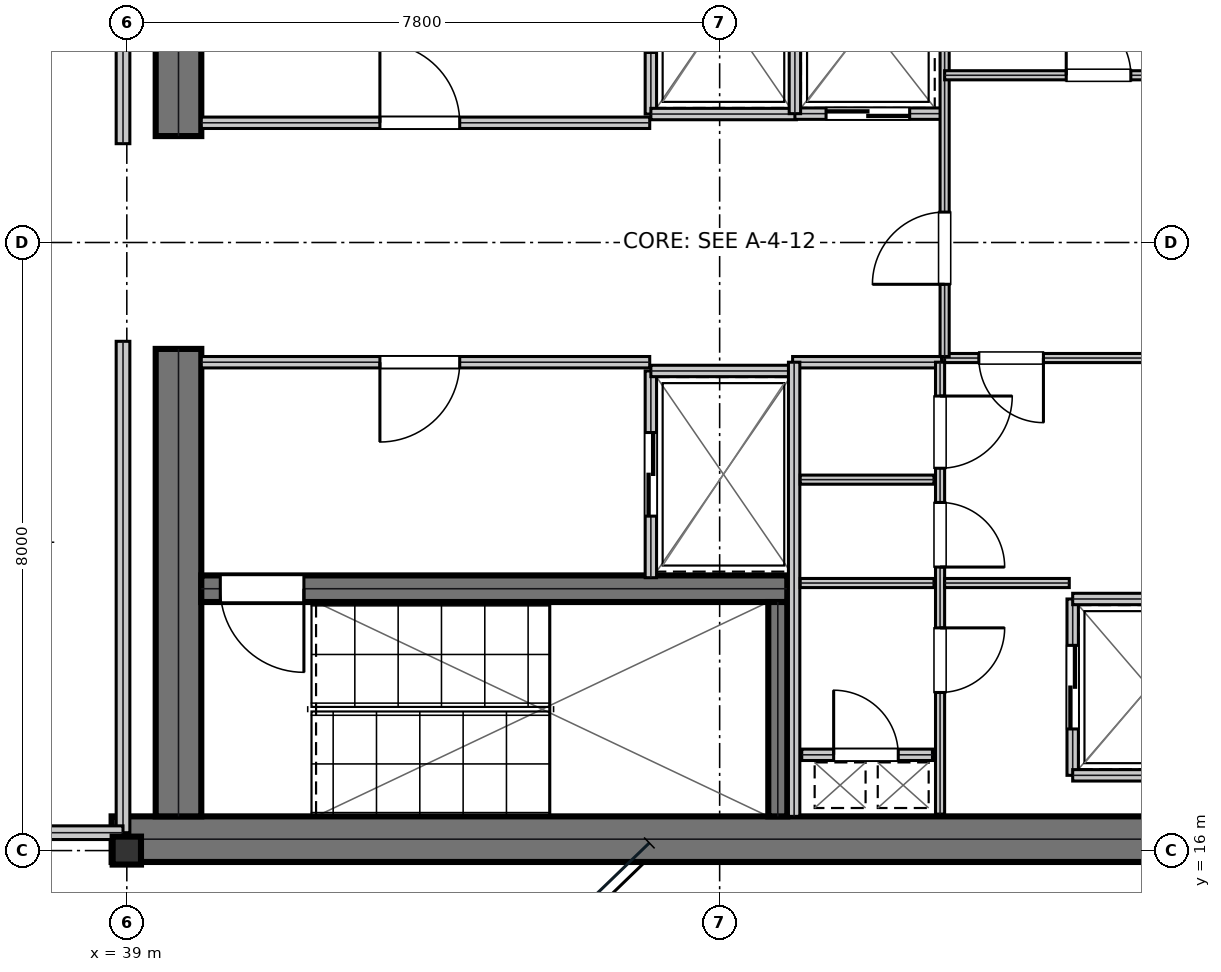
"""IFC4 building model, lengths in metres.
Left out: names, types, materials, properties, quantities, classifications, styles, units other than length and angle.
Written with IfcOpenShell. Run it as: python <this file> out.ifc"""

import sys

from ifc_helpers import new_model, si_unit, direction, frame, frame_2d, origin, origin_2d, place, context, subcontext, project, spatial, rectangle, i_section, extrude, element, fill, save


model = new_model("IFC4")
c1 = context("Model", 3, precision=1e-05, world=origin(), true_north=direction((0.0, 1.0)))
c2 = subcontext(c1, "Body", "Model", "MODEL_VIEW")
j1 = project(units=[si_unit("LENGTHUNIT", "METRE"), si_unit("PLANEANGLEUNIT", "RADIAN")], contexts=[c1])
p1 = place(None, origin())
s1 = spatial("IfcSite", under=j1, at=p1, CompositionType="ELEMENT")
p2 = place(p1, origin())
s2 = spatial("IfcBuilding", under=s1, at=p2, CompositionType="ELEMENT")
p3 = place(p2, frame((0.0, 0.0, 319.5)))
s3 = spatial("IfcBuildingStorey", under=s2, at=p3, CompositionType="ELEMENT", Elevation=319.5)
p4 = place(p3, frame((38.8, 16.15, 0.0), z_axis=(0.0, 0.0, 1.0), x_axis=(1.0, 0.0, 0.0)))
e1 = element("IfcWall", 1, at=p4, inside=s3, PredefinedType="SHEAR", context=c2, shape_type="SweptSolid", body=[
    extrude(rectangle(XDim=16.0, YDim=0.6, at=frame_2d((8.0, 0.0))), origin(), (0.0, 0.0, 1.0), 3.81),
])
for number, where, z_axis, x_axis in (
    (2, (39.68, 16.45, 0.0), (0.0, 0.0, 1.0), (0.0, 1.0, 0.0)),
    (3, (39.68, 25.4, 0.0), (0.0, 0.0, 1.0), (0.0, 1.0, 0.0)),
):
    element("IfcWall", number, at=place(p3, frame(where, z_axis=z_axis, x_axis=x_axis)), inside=s3, PredefinedType="SHEAR", context=c2, shape_type="SweptSolid", body=[
        extrude(rectangle(XDim=6.15, YDim=0.6, at=frame_2d((3.075, 0.0))), origin(), (0.0, 0.0, 1.0), 3.81),
    ])
p5 = place(p3, frame((39.98, 19.445, 0.0), z_axis=(0.0, 0.0, 1.0), x_axis=(1.0, 0.0, 0.0)))
e4 = element("IfcWall", 4, at=p5, inside=s3, PredefinedType="SHEAR", context=c2, shape_type="SweptSolid", body=[
    extrude(rectangle(XDim=7.71, YDim=0.35, at=frame_2d((3.855, 0.0))), origin(), (0.0, 0.0, 1.0), 3.81),
])
p6 = place(p5, frame((0.25, 0.0, 0.0)))
e5 = element("IfcOpeningElement", 5, at=p6, cuts=e4, PredefinedType="OPENING", context=c2, shape_type="SweptSolid", body=[
    extrude(rectangle(XDim=1.1, YDim=2.15, at=frame_2d((0.55, 1.075))), frame((0.0, 0.185, 0.0), z_axis=(0.0, -1.0, 0.0), x_axis=(1.0, 0.0, 0.0)), (0.0, 0.0, 1.0), 0.37),
])
p7 = place(p3, frame((47.565, 16.45, 0.0), z_axis=(0.0, 0.0, 1.0), x_axis=(0.0, 1.0, 0.0)))
e6 = element("IfcWall", 6, at=p7, inside=s3, PredefinedType="SHEAR", context=c2, shape_type="SweptSolid", body=[
    extrude(rectangle(XDim=2.82, YDim=0.25, at=frame_2d((1.41, 0.0))), origin(), (0.0, 0.0, 1.0), 3.81),
])
p8 = place(p3, frame((39.0, 16.0, 0.0), z_axis=(0.0, 0.0, 1.0), x_axis=(1.0, 0.0, 0.0)))
e7 = element("IfcColumn", 7, at=p8, inside=s3, PredefinedType="COLUMN", context=c2, shape_type="SweptSolid", body=[
    extrude(i_section(OverallWidth=0.373, OverallDepth=0.368, WebThickness=0.015, FlangeThickness=0.024, at=origin_2d()), origin(), (0.0, 0.0, 1.0), 4.044),
])
p9 = place(p3, frame((39.98, 25.575, 0.0), z_axis=(0.0, 0.0, 1.0), x_axis=(1.0, 0.0, 0.0)))
e8 = element("IfcWall", 8, at=p9, inside=s3, PredefinedType="PARTITIONING", context=c2, shape_type="SweptSolid", body=[
    extrude(rectangle(XDim=5.9, YDim=0.15, at=frame_2d((2.95, 0.0))), origin(), (0.0, 0.0, 1.0), 3.81),
])
p10 = place(p9, frame((2.35, 0.0, 0.0)))
e9 = element("IfcOpeningElement", 9, at=p10, cuts=e8, PredefinedType="OPENING", context=c2, shape_type="SweptSolid", body=[
    extrude(rectangle(XDim=1.05, YDim=2.15, at=frame_2d((0.525, 1.075))), frame((0.0, 0.085, 0.0), z_axis=(0.0, -1.0, 0.0), x_axis=(1.0, 0.0, 0.0)), (0.0, 0.0, 1.0), 0.17),
])
p11 = place(p3, frame((39.98, 22.425, 0.0), z_axis=(0.0, 0.0, 1.0), x_axis=(1.0, 0.0, 0.0)))
e10 = element("IfcWall", 10, at=p11, inside=s3, PredefinedType="PARTITIONING", context=c2, shape_type="SweptSolid", body=[
    extrude(rectangle(XDim=5.9, YDim=0.15, at=frame_2d((2.95, 0.0))), origin(), (0.0, 0.0, 1.0), 3.81),
])
p12 = place(p11, frame((2.35, 0.0, 0.0)))
e11 = element("IfcOpeningElement", 11, at=p12, cuts=e10, PredefinedType="OPENING", context=c2, shape_type="SweptSolid", body=[
    extrude(rectangle(XDim=1.05, YDim=2.15, at=frame_2d((0.525, 1.075))), frame((0.0, 0.085, 0.0), z_axis=(0.0, -1.0, 0.0), x_axis=(1.0, 0.0, 0.0)), (0.0, 0.0, 1.0), 0.17),
])
p13 = place(p3, frame((45.895, 25.69, 0.0), z_axis=(0.0, 0.0, 1.0), x_axis=(0.0, 1.0, 0.0)))
e12 = element("IfcWall", 12, at=p13, inside=s3, PredefinedType="PARTITIONING", context=c2, shape_type="SweptSolid", body=[
    extrude(rectangle(XDim=2.72, YDim=0.15, at=frame_2d((1.36, 0.0))), origin(), (0.0, 0.0, 1.0), 3.81),
])
p14 = place(p13, frame((0.81, 0.0, 0.0)))
e13 = element("IfcOpeningElement", 13, at=p14, cuts=e12, PredefinedType="OPENING", context=c2, shape_type="SweptSolid", body=[
    extrude(rectangle(XDim=1.1, YDim=2.15, at=frame_2d((0.55, 1.075))), frame((0.0, 0.085, 0.0), z_axis=(0.0, -1.0, 0.0), x_axis=(1.0, 0.0, 0.0)), (0.0, 0.0, 1.0), 0.17),
])
p15 = place(p3, frame((45.895, 25.69, 0.0), z_axis=(0.0, 0.0, 1.0), x_axis=(1.0, 0.0, 0.0)))
e14 = element("IfcWall", 14, at=p15, inside=s3, PredefinedType="PARTITIONING", context=c2, shape_type="SweptSolid", body=[
    extrude(rectangle(XDim=1.915, YDim=0.15, at=frame_2d((0.958, 0.0))), origin(), (0.0, 0.0, 1.0), 3.81),
])
p16 = place(p3, frame((45.895, 19.59, 0.0), z_axis=(0.0, 0.0, 1.0), x_axis=(0.0, 1.0, 0.0)))
e15 = element("IfcWall", 15, at=p16, inside=s3, PredefinedType="PARTITIONING", context=c2, shape_type="SweptSolid", body=[
    extrude(rectangle(XDim=2.72, YDim=0.15, at=frame_2d((1.36, 0.0))), origin(), (0.0, 0.0, 1.0), 3.81),
])
p17 = place(p16, frame((0.81, 0.0, 0.0)))
e16 = element("IfcOpeningElement", 16, at=p17, cuts=e15, PredefinedType="OPENING", context=c2, shape_type="SweptSolid", body=[
    extrude(rectangle(XDim=1.1, YDim=2.15, at=frame_2d((0.55, 1.075))), frame((0.0, 0.085, 0.0), z_axis=(0.0, -1.0, 0.0), x_axis=(1.0, 0.0, 0.0)), (0.0, 0.0, 1.0), 0.17),
])
p18 = place(p3, frame((45.895, 22.31, 0.0), z_axis=(0.0, 0.0, 1.0), x_axis=(1.0, 0.0, 0.0)))
e17 = element("IfcWall", 17, at=p18, inside=s3, PredefinedType="PARTITIONING", context=c2, shape_type="SweptSolid", body=[
    extrude(rectangle(XDim=1.915, YDim=0.15, at=frame_2d((0.958, 0.0))), origin(), (0.0, 0.0, 1.0), 3.81),
])
p19 = place(p3, frame((47.79, 25.695, 0.0), z_axis=(0.0, 0.0, 1.0), x_axis=(1.0, 0.0, 0.0)))
e18 = element("IfcWall", 18, at=p19, inside=s3, PredefinedType="PARTITIONING", context=c2, shape_type="SweptSolid", body=[
    extrude(rectangle(XDim=1.92, YDim=0.15, at=frame_2d((0.96, 0.0))), origin(), (0.0, 0.0, 1.0), 3.81),
])
p20 = place(p19, frame((0.41, 0.0, 0.0)))
e19 = element("IfcOpeningElement", 19, at=p20, cuts=e18, PredefinedType="OPENING", context=c2, shape_type="SweptSolid", body=[
    extrude(rectangle(XDim=1.1, YDim=2.15, at=frame_2d((0.55, 1.075))), frame((0.0, 0.085, 0.0), z_axis=(0.0, -1.0, 0.0), x_axis=(1.0, 0.0, 0.0)), (0.0, 0.0, 1.0), 0.17),
])
p21 = place(p3, frame((47.79, 25.695, 0.0), z_axis=(0.0, 0.0, 1.0), x_axis=(0.0, 1.0, 0.0)))
e20 = element("IfcWall", 20, at=p21, inside=s3, PredefinedType="PARTITIONING", context=c2, shape_type="SweptSolid", body=[
    extrude(rectangle(XDim=2.415, YDim=0.15, at=frame_2d((1.208, 0.0))), origin(), (0.0, 0.0, 1.0), 3.81),
])
p22 = place(p3, frame((51.445, 16.99, 0.0), z_axis=(0.0, 0.0, 1.0), x_axis=(0.0, 1.0, 0.0)))
e21 = element("IfcWall", 21, at=p22, inside=s3, PredefinedType="PARTITIONING", context=c2, shape_type="SweptSolid", body=[
    extrude(rectangle(XDim=2.32, YDim=0.15, at=frame_2d((1.16, 0.0))), origin(), (0.0, 0.0, 1.0), 3.81),
])
p23 = place(p22, frame((0.61, 0.0, 0.0)))
e22 = element("IfcOpeningElement", 22, at=p23, cuts=e21, PredefinedType="OPENING", context=c2, shape_type="SweptSolid", body=[
    extrude(rectangle(XDim=1.1, YDim=2.15, at=frame_2d((0.55, 1.075))), frame((0.0, 0.085, 0.0), z_axis=(0.0, -1.0, 0.0), x_axis=(1.0, 0.0, 0.0)), (0.0, 0.0, 1.0), 0.17),
])
for number, where, z_axis, x_axis in (
    (23, (51.445, 16.99, 0.0), (0.0, 0.0, 1.0), (1.0, 0.0, 0.0)),
    (24, (51.445, 19.31, 0.0), (0.0, 0.0, 1.0), (1.0, 0.0, 0.0)),
):
    element("IfcWall", number, at=place(p3, frame(where, z_axis=z_axis, x_axis=x_axis)), inside=s3, PredefinedType="PARTITIONING", context=c2, shape_type="SweptSolid", body=[
        extrude(rectangle(XDim=2.015, YDim=0.15, at=frame_2d((1.007, 0.0))), origin(), (0.0, 0.0, 1.0), 3.81),
    ])
p24 = place(p3, frame((47.88, 17.26, 0.0), z_axis=(0.0, 0.0, 1.0), x_axis=(1.0, 0.0, 0.0)))
e25 = element("IfcWall", 25, at=p24, inside=s3, PredefinedType="PARTITIONING", context=c2, shape_type="SweptSolid", body=[
    extrude(rectangle(XDim=1.72, YDim=0.15, at=frame_2d((0.86, 0.0))), origin(), (0.0, 0.0, 1.0), 3.81),
])
p25 = place(p24, frame((0.42, 0.0, 0.0)))
e26 = element("IfcOpeningElement", 26, at=p25, cuts=e25, PredefinedType="OPENING", context=c2, shape_type="SweptSolid", body=[
    extrude(rectangle(XDim=0.85, YDim=2.15, at=frame_2d((0.425, 1.075))), frame((0.0, 0.085, 0.0), z_axis=(0.0, -1.0, 0.0), x_axis=(1.0, 0.0, 0.0)), (0.0, 0.0, 1.0), 0.17),
])
p26 = place(p3, frame((47.76, 22.425, 0.0), z_axis=(0.0, 0.0, 1.0), x_axis=(1.0, 0.0, 0.0)))
e27 = element("IfcWall", 27, at=p26, inside=s3, PredefinedType="PARTITIONING", context=c2, shape_type="SweptSolid", body=[
    extrude(rectangle(XDim=1.96, YDim=0.15, at=frame_2d((0.98, 0.0))), origin(), (0.0, 0.0, 1.0), 3.81),
])
p27 = place(p3, frame((47.78, 16.45, 0.0), z_axis=(0.0, 0.0, 1.0), x_axis=(0.0, 1.0, 0.0)))
e28 = element("IfcWall", 28, at=p27, inside=s3, PredefinedType="PARTITIONING", context=c2, shape_type="SweptSolid", body=[
    extrude(rectangle(XDim=5.975, YDim=0.15, at=frame_2d((2.988, 0.0))), origin(), (0.0, 0.0, 1.0), 3.81),
])
for number, where, z_axis, x_axis in (
    (29, (47.86, 19.52, 0.0), (0.0, 0.0, 1.0), (1.0, 0.0, 0.0)),
    (30, (47.86, 20.88, 0.0), (0.0, 0.0, 1.0), (1.0, 0.0, 0.0)),
):
    element("IfcWall", number, at=place(p3, frame(where, z_axis=z_axis, x_axis=x_axis)), inside=s3, PredefinedType="PARTITIONING", context=c2, shape_type="SweptSolid", body=[
        extrude(rectangle(XDim=1.76, YDim=0.12, at=frame_2d((0.88, 0.0))), origin(), (0.0, 0.0, 1.0), 3.81),
    ])
p28 = place(p3, frame((49.7, 16.48, 0.0), z_axis=(0.0, 0.0, 1.0), x_axis=(0.0, 1.0, 0.0)))
e31 = element("IfcWall", 31, at=p28, inside=s3, PredefinedType="PARTITIONING", context=c2, shape_type="SweptSolid", body=[
    extrude(rectangle(XDim=5.945, YDim=0.12, at=frame_2d((2.973, 0.0))), origin(), (0.0, 0.0, 1.0), 3.81),
])
p29 = place(p28, frame((1.6, 0.0, 0.0)))
e32 = element("IfcOpeningElement", 32, at=p29, cuts=e31, PredefinedType="OPENING", context=c2, shape_type="SweptSolid", body=[
    extrude(rectangle(XDim=0.85, YDim=2.15, at=frame_2d((0.425, 1.075))), frame((0.0, 0.07, 0.0), z_axis=(0.0, -1.0, 0.0), x_axis=(1.0, 0.0, 0.0)), (0.0, 0.0, 1.0), 0.14),
])
p30 = place(p28, frame((3.25, 0.0, 0.0)))
e33 = element("IfcOpeningElement", 33, at=p30, cuts=e31, PredefinedType="OPENING", context=c2, shape_type="SweptSolid", body=[
    extrude(rectangle(XDim=0.85, YDim=2.15, at=frame_2d((0.425, 1.075))), frame((0.0, 0.07, 0.0), z_axis=(0.0, -1.0, 0.0), x_axis=(1.0, 0.0, 0.0)), (0.0, 0.0, 1.0), 0.14),
])
p31 = place(p28, frame((4.55, 0.0, 0.0)))
e34 = element("IfcOpeningElement", 34, at=p31, cuts=e31, PredefinedType="OPENING", context=c2, shape_type="SweptSolid", body=[
    extrude(rectangle(XDim=0.95, YDim=2.15, at=frame_2d((0.475, 1.075))), frame((0.0, 0.07, 0.0), z_axis=(0.0, -1.0, 0.0), x_axis=(1.0, 0.0, 0.0)), (0.0, 0.0, 1.0), 0.14),
])
p32 = place(p3, frame((49.76, 22.48, 0.0), z_axis=(0.0, 0.0, 1.0), x_axis=(1.0, 0.0, 0.0)))
e35 = element("IfcWall", 35, at=p32, inside=s3, PredefinedType="PARTITIONING", context=c2, shape_type="SweptSolid", body=[
    extrude(rectangle(XDim=3.9, YDim=0.12, at=frame_2d((1.95, 0.0))), origin(), (0.0, 0.0, 1.0), 3.81),
])
p33 = place(p32, frame((0.45, 0.0, 0.0)))
e36 = element("IfcOpeningElement", 36, at=p33, cuts=e35, PredefinedType="OPENING", context=c2, shape_type="SweptSolid", body=[
    extrude(rectangle(XDim=0.85, YDim=2.15, at=frame_2d((0.425, 1.075))), frame((0.0, 0.07, 0.0), z_axis=(0.0, -1.0, 0.0), x_axis=(1.0, 0.0, 0.0)), (0.0, 0.0, 1.0), 0.14),
])
p34 = place(p3, frame((49.76, 19.52, 0.0), z_axis=(0.0, 0.0, 1.0), x_axis=(1.0, 0.0, 0.0)))
e37 = element("IfcWall", 37, at=p34, inside=s3, PredefinedType="PARTITIONING", context=c2, shape_type="SweptSolid", body=[
    extrude(rectangle(XDim=1.64, YDim=0.12, at=frame_2d((0.82, 0.0))), origin(), (0.0, 0.0, 1.0), 3.81),
])
p35 = place(p3, frame((49.76, 22.5, 0.0), z_axis=(0.0, 0.0, 1.0), x_axis=(0.0, 1.0, 0.0)))
e38 = element("IfcWall", 38, at=p35, inside=s3, PredefinedType="PARTITIONING", context=c2, shape_type="SweptSolid", body=[
    extrude(rectangle(XDim=5.72, YDim=0.12, at=frame_2d((2.86, 0.0))), origin(), (0.0, 0.0, 1.0), 3.81),
])
p36 = place(p35, frame((0.95, 0.0, 0.0)))
e39 = element("IfcOpeningElement", 39, at=p36, cuts=e38, PredefinedType="OPENING", context=c2, shape_type="SweptSolid", body=[
    extrude(rectangle(XDim=0.95, YDim=2.15, at=frame_2d((0.475, 1.075))), frame((0.0, 0.07, 0.0), z_axis=(0.0, -1.0, 0.0), x_axis=(1.0, 0.0, 0.0)), (0.0, 0.0, 1.0), 0.14),
])
p37 = place(p3, frame((49.76, 26.2, 0.0), z_axis=(0.0, 0.0, 1.0), x_axis=(1.0, 0.0, 0.0)))
e40 = element("IfcWall", 40, at=p37, inside=s3, PredefinedType="PARTITIONING", context=c2, shape_type="SweptSolid", body=[
    extrude(rectangle(XDim=3.9, YDim=0.12, at=frame_2d((1.95, 0.0))), origin(), (0.0, 0.0, 1.0), 3.81),
])
p38 = place(p37, frame((1.6, 0.0, 0.0)))
e41 = element("IfcOpeningElement", 41, at=p38, cuts=e40, PredefinedType="OPENING", context=c2, shape_type="SweptSolid", body=[
    extrude(rectangle(XDim=0.85, YDim=2.15, at=frame_2d((0.425, 1.075))), frame((0.0, 0.07, 0.0), z_axis=(0.0, -1.0, 0.0), x_axis=(1.0, 0.0, 0.0)), (0.0, 0.0, 1.0), 0.14),
])
p39 = place(p3, frame((38.95, 16.235, 0.0), z_axis=(0.0, 0.0, 1.0), x_axis=(0.0, 1.0, 0.0)))
e42 = element("IfcWall", 42, at=p39, inside=s3, PredefinedType="SOLIDWALL", context=c2, shape_type="SweptSolid", body=[
    extrude(rectangle(XDim=6.465, YDim=0.18, at=frame_2d((3.232, 0.0))), origin(), (0.0, 0.0, 1.0), 2.886),
])
p40 = place(p3, frame((37.05, 16.235, 0.0), z_axis=(0.0, 0.0, 1.0), x_axis=(1.0, 0.0, 0.0)))
e43 = element("IfcWall", 43, at=p40, inside=s3, PredefinedType="SOLIDWALL", context=c2, shape_type="SweptSolid", body=[
    extrude(rectangle(XDim=1.9, YDim=0.18, at=frame_2d((0.95, 0.0))), origin(), (0.0, 0.0, 1.0), 3.27),
])
p41 = place(p3, frame((38.95, 25.3, 0.0), z_axis=(0.0, 0.0, 1.0), x_axis=(0.0, 1.0, 0.0)))
e44 = element("IfcWall", 44, at=p41, inside=s3, PredefinedType="SOLIDWALL", context=c2, shape_type="SweptSolid", body=[
    extrude(rectangle(XDim=6.465, YDim=0.18, at=frame_2d((3.232, 0.0))), origin(), (0.0, 0.0, 1.0), 2.886),
])
p42 = place(p10, origin())
e45 = element("IfcDoor", 45, at=p42, inside=s3, OperationType="SINGLE_SWING_LEFT", PredefinedType="DOOR", context=c2, shape_type="SweptSolid", body=[
    extrude(rectangle(XDim=1.05, YDim=2.15, at=frame_2d((0.525, 1.075))), frame((0.0, 0.025, 0.0), z_axis=(0.0, -1.0, 0.0), x_axis=(1.0, 0.0, 0.0)), (0.0, 0.0, 1.0), 0.05),
])
fill(e9, e45)
p43 = place(p12, frame((1.05, 0.0, 0.0), z_axis=(0.0, 0.0, 1.0), x_axis=(-1.0, 0.0, 0.0)))
e46 = element("IfcDoor", 46, at=p43, inside=s3, OperationType="SINGLE_SWING_RIGHT", PredefinedType="DOOR", context=c2, shape_type="SweptSolid", body=[
    extrude(rectangle(XDim=1.05, YDim=2.15, at=frame_2d((0.525, 1.075))), frame((0.0, 0.025, 0.0), z_axis=(0.0, -1.0, 0.0), x_axis=(1.0, 0.0, 0.0)), (0.0, 0.0, 1.0), 0.05),
])
fill(e11, e46)
p44 = place(p17, frame((1.1, 0.0, 0.0), z_axis=(0.0, 0.0, 1.0), x_axis=(-1.0, 0.0, 0.0)))
e47 = element("IfcDoor", 47, at=p44, inside=s3, OperationType="DOUBLE_DOOR_SLIDING", PredefinedType="DOOR", context=c2, shape_type="SweptSolid", body=[
    extrude(rectangle(XDim=1.1, YDim=2.15, at=frame_2d((0.55, 1.075))), frame((0.0, 0.025, 0.0), z_axis=(0.0, -1.0, 0.0), x_axis=(1.0, 0.0, 0.0)), (0.0, 0.0, 1.0), 0.05),
])
fill(e16, e47)
p45 = place(p20, frame((1.1, 0.0, 0.0), z_axis=(0.0, 0.0, 1.0), x_axis=(-1.0, 0.0, 0.0)))
e48 = element("IfcDoor", 48, at=p45, inside=s3, OperationType="DOUBLE_DOOR_SLIDING", PredefinedType="DOOR", context=c2, shape_type="SweptSolid", body=[
    extrude(rectangle(XDim=1.1, YDim=2.15, at=frame_2d((0.55, 1.075))), frame((0.0, 0.025, 0.0), z_axis=(0.0, -1.0, 0.0), x_axis=(1.0, 0.0, 0.0)), (0.0, 0.0, 1.0), 0.05),
])
fill(e19, e48)
p46 = place(p23, frame((1.1, 0.0, 0.0), z_axis=(0.0, 0.0, 1.0), x_axis=(-1.0, 0.0, 0.0)))
e49 = element("IfcDoor", 49, at=p46, inside=s3, OperationType="DOUBLE_DOOR_SLIDING", PredefinedType="DOOR", context=c2, shape_type="SweptSolid", body=[
    extrude(rectangle(XDim=1.1, YDim=2.15, at=frame_2d((0.55, 1.075))), frame((0.0, 0.025, 0.0), z_axis=(0.0, -1.0, 0.0), x_axis=(1.0, 0.0, 0.0)), (0.0, 0.0, 1.0), 0.05),
])
fill(e22, e49)
p47 = place(p25, origin())
e50 = element("IfcDoor", 50, at=p47, inside=s3, OperationType="SINGLE_SWING_LEFT", PredefinedType="TRAPDOOR", context=c2, shape_type="SweptSolid", body=[
    extrude(rectangle(XDim=0.85, YDim=2.15, at=frame_2d((0.425, 1.075))), frame((0.0, 0.025, 0.0), z_axis=(0.0, -1.0, 0.0), x_axis=(1.0, 0.0, 0.0)), (0.0, 0.0, 1.0), 0.05),
])
fill(e26, e50)
p48 = place(p29, frame((0.85, 0.0, 0.0), z_axis=(0.0, 0.0, 1.0), x_axis=(-1.0, 0.0, 0.0)))
e51 = element("IfcDoor", 51, at=p48, inside=s3, OperationType="SINGLE_SWING_LEFT", PredefinedType="DOOR", context=c2, shape_type="SweptSolid", body=[
    extrude(rectangle(XDim=0.85, YDim=2.15, at=frame_2d((0.425, 1.075))), frame((0.0, 0.025, 0.0), z_axis=(0.0, -1.0, 0.0), x_axis=(1.0, 0.0, 0.0)), (0.0, 0.0, 1.0), 0.05),
])
fill(e32, e51)
p49 = place(p30, frame((0.85, 0.0, 0.0), z_axis=(0.0, 0.0, 1.0), x_axis=(-1.0, 0.0, 0.0)))
e52 = element("IfcDoor", 52, at=p49, inside=s3, OperationType="SINGLE_SWING_RIGHT", PredefinedType="DOOR", context=c2, shape_type="SweptSolid", body=[
    extrude(rectangle(XDim=0.85, YDim=2.15, at=frame_2d((0.425, 1.075))), frame((0.0, 0.025, 0.0), z_axis=(0.0, -1.0, 0.0), x_axis=(1.0, 0.0, 0.0)), (0.0, 0.0, 1.0), 0.05),
])
fill(e33, e52)
p50 = place(p31, frame((0.95, 0.0, 0.0), z_axis=(0.0, 0.0, 1.0), x_axis=(-1.0, 0.0, 0.0)))
e53 = element("IfcDoor", 53, at=p50, inside=s3, OperationType="SINGLE_SWING_LEFT", PredefinedType="DOOR", context=c2, shape_type="SweptSolid", body=[
    extrude(rectangle(XDim=0.95, YDim=2.15, at=frame_2d((0.475, 1.075))), frame((0.0, 0.025, 0.0), z_axis=(0.0, -1.0, 0.0), x_axis=(1.0, 0.0, 0.0)), (0.0, 0.0, 1.0), 0.05),
])
fill(e34, e53)
p51 = place(p33, frame((0.85, 0.0, 0.0), z_axis=(0.0, 0.0, 1.0), x_axis=(-1.0, 0.0, 0.0)))
e54 = element("IfcDoor", 54, at=p51, inside=s3, OperationType="SINGLE_SWING_LEFT", PredefinedType="DOOR", context=c2, shape_type="SweptSolid", body=[
    extrude(rectangle(XDim=0.85, YDim=2.15, at=frame_2d((0.425, 1.075))), frame((0.0, 0.025, 0.0), z_axis=(0.0, -1.0, 0.0), x_axis=(1.0, 0.0, 0.0)), (0.0, 0.0, 1.0), 0.05),
])
fill(e36, e54)
p52 = place(p36, origin())
e55 = element("IfcDoor", 55, at=p52, inside=s3, OperationType="SINGLE_SWING_LEFT", PredefinedType="DOOR", context=c2, shape_type="SweptSolid", body=[
    extrude(rectangle(XDim=0.95, YDim=2.15, at=frame_2d((0.475, 1.075))), frame((0.0, 0.025, 0.0), z_axis=(0.0, -1.0, 0.0), x_axis=(1.0, 0.0, 0.0)), (0.0, 0.0, 1.0), 0.05),
])
fill(e39, e55)
p53 = place(p38, origin())
e56 = element("IfcDoor", 56, at=p53, inside=s3, OperationType="SINGLE_SWING_LEFT", PredefinedType="DOOR", context=c2, shape_type="SweptSolid", body=[
    extrude(rectangle(XDim=0.85, YDim=2.15, at=frame_2d((0.425, 1.075))), frame((0.0, 0.025, 0.0), z_axis=(0.0, -1.0, 0.0), x_axis=(1.0, 0.0, 0.0)), (0.0, 0.0, 1.0), 0.05),
])
fill(e41, e56)
p54 = place(p6, frame((1.1, 0.0, 0.0), z_axis=(0.0, 0.0, 1.0), x_axis=(-1.0, 0.0, 0.0)))
e57 = element("IfcDoor", 57, at=p54, inside=s3, OperationType="SINGLE_SWING_LEFT", PredefinedType="DOOR", context=c2, shape_type="SweptSolid", body=[
    extrude(rectangle(XDim=1.1, YDim=2.15, at=frame_2d((0.55, 1.075))), frame((0.0, 0.025, 0.0), z_axis=(0.0, -1.0, 0.0), x_axis=(1.0, 0.0, 0.0)), (0.0, 0.0, 1.0), 0.05),
])
fill(e5, e57)
save(model, sys.argv[1])
